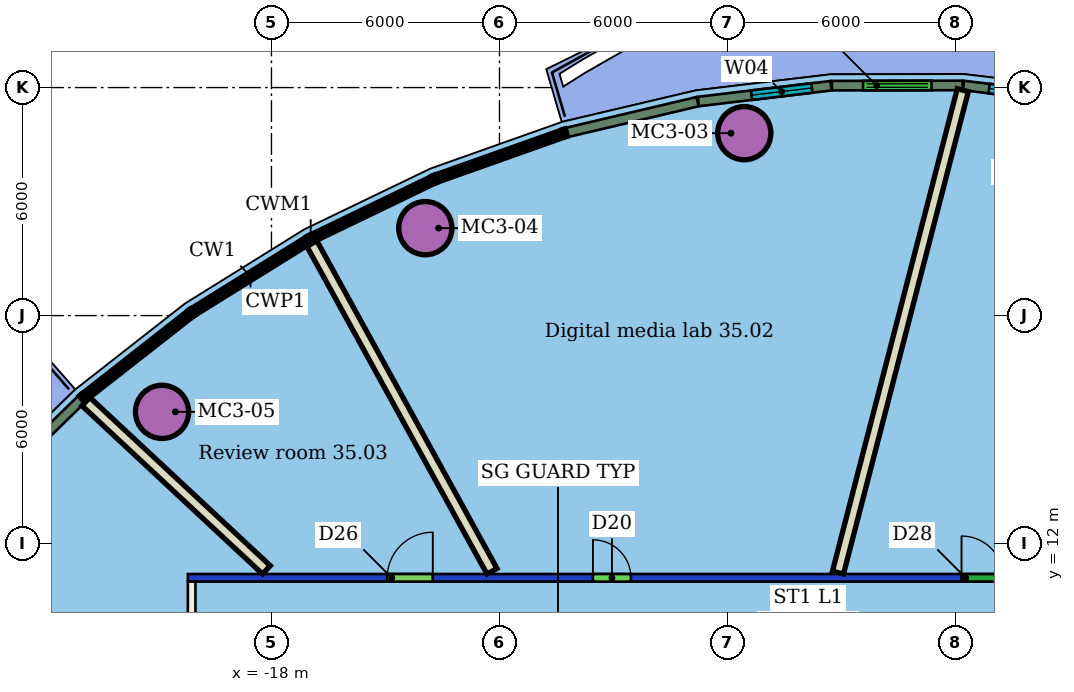
"""IFC4 building model, lengths in metres.
Left out: names, types, materials, properties, quantities, classifications, styles, units other than length and angle.
Written with IfcOpenShell. Run it as: python <this file> out.ifc"""

import sys

from ifc_helpers import new_model, si_unit, direction, frame, frame_2d, origin, origin_2d, place, context, subcontext, project, spatial, rectangle, hollow_circle, extrude, element, fill, save


model = new_model("IFC4")
c1 = context("Model", 3, precision=1e-05, world=origin(), true_north=direction((0.0, 1.0)))
c2 = subcontext(c1, "Body", "Model", "MODEL_VIEW")
j1 = project(units=[si_unit("LENGTHUNIT", "METRE"), si_unit("PLANEANGLEUNIT", "RADIAN")], contexts=[c1])
p1 = place(None, origin())
s1 = spatial("IfcSite", under=j1, at=p1, CompositionType="ELEMENT")
p2 = place(p1, origin())
s2 = spatial("IfcBuilding", under=s1, at=p2, CompositionType="ELEMENT")
p3 = place(p2, frame((0.0, 0.0, 150.6)))
s3 = spatial("IfcBuildingStorey", under=s2, at=p3, CompositionType="ELEMENT", Elevation=150.6)
for number, where, z_axis, x_axis in (
    (1, (-5.558, 22.8, 0.0), (0.0, 0.0, 1.0), (1.0, 0.0, 0.0)),
    (2, (-13.952, 20.301, 0.0), (0.0, 0.0, 1.0), (1.0, 0.0, 0.0)),
    (3, (-20.879, 15.467, 0.0), (0.0, 0.0, 1.0), (1.0, 0.0, 0.0)),
):
    element("IfcColumn", number, at=place(p3, frame(where, z_axis=z_axis, x_axis=x_axis)), inside=s3, PredefinedType="COLUMN", context=c2, shape_type="SweptSolid", body=[
        extrude(hollow_circle(Radius=0.7, WallThickness=0.05, at=origin_2d()), origin(), (0.0, 0.0, 1.0), 3.45),
    ])
p4 = place(p3, frame((-20.1, -11.0, 0.0), z_axis=(0.0, 0.0, 1.0), x_axis=(0.0, 1.0, 0.0)))
e4 = element("IfcWall", 4, at=p4, inside=s3, PredefinedType="PARTITIONING", context=c2, shape_type="SweptSolid", body=[
    extrude(rectangle(XDim=22.0, YDim=0.2, at=frame_2d((11.0, 0.0))), origin(), (0.0, 0.0, 1.0), 3.45),
])
p5 = place(p4, frame((16.014, 0.0, 0.0)))
e5 = element("IfcOpeningElement", 5, at=p5, cuts=e4, PredefinedType="OPENING", context=c2, shape_type="SweptSolid", body=[
    extrude(rectangle(XDim=1.2, YDim=2.1, at=frame_2d((0.6, 1.05))), frame((0.0, 0.11, 0.0), z_axis=(0.0, -1.0, 0.0), x_axis=(1.0, 0.0, 0.0)), (0.0, 0.0, 1.0), 0.22),
])
p6 = place(p4, frame((9.012, 0.0, 0.0)))
e6 = element("IfcOpeningElement", 6, at=p6, cuts=e4, PredefinedType="OPENING", context=c2, shape_type="SweptSolid", body=[
    extrude(rectangle(XDim=1.8, YDim=2.4, at=frame_2d((0.9, 1.2))), frame((0.0, 0.11, 0.0), z_axis=(0.0, -1.0, 0.0), x_axis=(1.0, 0.0, 0.0)), (0.0, 0.0, 1.0), 0.22),
])
p7 = place(p3, frame((-20.2, 11.1, 0.0), z_axis=(0.0, 0.0, 1.0), x_axis=(1.0, 0.0, 0.0)))
e7 = element("IfcWall", 7, at=p7, inside=s3, PredefinedType="PARTITIONING", context=c2, shape_type="SweptSolid", body=[
    extrude(rectangle(XDim=28.4, YDim=0.2, at=frame_2d((14.2, 0.0))), origin(), (0.0, 0.0, 1.0), 3.05),
])
p8 = place(p7, frame((20.358, 0.0, 0.0)))
e8 = element("IfcOpeningElement", 8, at=p8, cuts=e7, PredefinedType="OPENING", context=c2, shape_type="SweptSolid", body=[
    extrude(rectangle(XDim=1.1, YDim=2.1, at=frame_2d((0.55, 1.05))), frame((0.0, 0.11, 0.0), z_axis=(0.0, -1.0, 0.0), x_axis=(1.0, 0.0, 0.0)), (0.0, 0.0, 1.0), 0.22),
])
p9 = place(p7, frame((10.659, 0.0, 0.0)))
e9 = element("IfcOpeningElement", 9, at=p9, cuts=e7, PredefinedType="OPENING", context=c2, shape_type="SweptSolid", body=[
    extrude(rectangle(XDim=1.0, YDim=2.1, at=frame_2d((0.5, 1.05))), frame((0.0, 0.11, 0.0), z_axis=(0.0, -1.0, 0.0), x_axis=(1.0, 0.0, 0.0)), (0.0, 0.0, 1.0), 0.22),
])
p10 = place(p7, frame((5.245, 0.0, 0.0)))
e10 = element("IfcOpeningElement", 10, at=p10, cuts=e7, PredefinedType="OPENING", context=c2, shape_type="SweptSolid", body=[
    extrude(rectangle(XDim=1.2, YDim=2.1, at=frame_2d((0.6, 1.05))), frame((0.0, 0.11, 0.0), z_axis=(0.0, -1.0, 0.0), x_axis=(1.0, 0.0, 0.0)), (0.0, 0.0, 1.0), 0.22),
])
p11 = place(p3, frame((0.192, 23.931, 0.0), z_axis=(0.0, 0.0, 1.0), x_axis=(-0.25047941352, -0.968121925897, 0.0)))
e11 = element("IfcWall", 11, at=p11, inside=s3, PredefinedType="PARTITIONING", context=c2, shape_type="SweptSolid", body=[
    extrude(rectangle(XDim=13.112, YDim=0.3, at=frame_2d((6.556, 0.0))), origin(), (0.0, 0.0, 1.0), 3.45),
])
p12 = place(p3, frame((-16.937, 19.894, 0.0), z_axis=(0.0, 0.0, 1.0), x_axis=(0.48175299215, -0.87630705495, 0.0)))
e12 = element("IfcWall", 12, at=p12, inside=s3, PredefinedType="PARTITIONING", context=c2, shape_type="SweptSolid", body=[
    extrude(rectangle(XDim=9.839, YDim=0.3, at=frame_2d((4.919, 0.0))), origin(), (0.0, 0.0, 1.0), 3.45),
])
p13 = place(p3, frame((-22.883, 15.737, 0.0), z_axis=(0.0, 0.0, 1.0), x_axis=(0.731506509166, -0.681834457217, 0.0)))
e13 = element("IfcWall", 13, at=p13, inside=s3, PredefinedType="PARTITIONING", context=c2, shape_type="SweptSolid", body=[
    extrude(rectangle(XDim=6.493, YDim=0.3, at=frame_2d((3.246, 0.0))), origin(), (0.0, 0.0, 1.0), 3.45),
])
p14 = place(p3, frame((3.543, 23.651, 0.0), z_axis=(0.0, 0.0, 1.0), x_axis=(-0.992754830244, 0.120157592466, 0.0)))
e14 = element("IfcWall", 14, at=p14, inside=s3, PredefinedType="SOLIDWALL", context=c2, shape_type="SweptSolid", body=[
    extrude(rectangle(XDim=3.357, YDim=0.25, at=frame_2d((1.678, 0.0))), origin(), (0.0, 0.0, 1.0), 3.1),
])
p15 = place(p14, frame((0.678, 0.0, 0.9)))
e15 = element("IfcOpeningElement", 15, at=p15, cuts=e14, PredefinedType="OPENING", context=c2, shape_type="SweptSolid", body=[
    extrude(rectangle(XDim=2.0, YDim=2.1, at=frame_2d((1.0, 1.05))), frame((0.0, 0.135, 0.0), z_axis=(0.0, -1.0, 0.0), x_axis=(1.0, 0.0, 0.0)), (0.0, 0.0, 1.0), 0.27),
])
p16 = place(p3, frame((0.187, 24.056, 0.0), z_axis=(0.0, 0.0, 1.0), x_axis=(-0.999998549944, -0.001702970638, 0.0)))
e16 = element("IfcWall", 16, at=p16, inside=s3, PredefinedType="SOLIDWALL", context=c2, shape_type="SweptSolid", body=[
    extrude(rectangle(XDim=3.441, YDim=0.25, at=frame_2d((1.72, 0.0))), origin(), (0.0, 0.0, 1.0), 3.1),
])
p17 = place(p16, frame((0.82, 0.0, 0.0)))
e17 = element("IfcOpeningElement", 17, at=p17, cuts=e16, PredefinedType="OPENING", context=c2, shape_type="SweptSolid", body=[
    extrude(rectangle(XDim=1.8, YDim=2.4, at=frame_2d((0.9, 1.2))), frame((0.0, 0.135, 0.0), z_axis=(0.0, -1.0, 0.0), x_axis=(1.0, 0.0, 0.0)), (0.0, 0.0, 1.0), 0.27),
])
p18 = place(p3, frame((-3.276, 24.049, 0.0), z_axis=(0.0, 0.0, 1.0), x_axis=(-0.992969234445, -0.11837271411, 0.0)))
e18 = element("IfcWall", 18, at=p18, inside=s3, PredefinedType="SOLIDWALL", context=c2, shape_type="SweptSolid", body=[
    extrude(rectangle(XDim=3.514, YDim=0.25, at=frame_2d((1.757, 0.0))), origin(), (0.0, 0.0, 1.0), 3.1),
])
p19 = place(p18, frame((0.507, 0.0, 0.9)))
e19 = element("IfcOpeningElement", 19, at=p19, cuts=e18, PredefinedType="OPENING", context=c2, shape_type="SweptSolid", body=[
    extrude(rectangle(XDim=1.6, YDim=2.1, at=frame_2d((0.8, 1.05))), frame((0.0, 0.135, 0.0), z_axis=(0.0, -1.0, 0.0), x_axis=(1.0, 0.0, 0.0)), (0.0, 0.0, 1.0), 0.27),
])
p20 = place(p3, frame((-6.787, 23.629, 0.0), z_axis=(0.0, 0.0, 1.0), x_axis=(-0.973349080419, -0.229328514683, 0.0)))
e20 = element("IfcWall", 20, at=p20, inside=s3, PredefinedType="SOLIDWALL", context=c2, shape_type="SweptSolid", body=[
    extrude(rectangle(XDim=3.529, YDim=0.25, at=frame_2d((1.765, 0.0))), origin(), (0.0, 0.0, 1.0), 3.1),
])
p21 = place(p3, frame((-23.005, 15.792, 0.0), z_axis=(0.0, 0.0, 1.0), x_axis=(-0.715154193922, -0.698966722324, 0.0)))
e21 = element("IfcWall", 21, at=p21, inside=s3, PredefinedType="SOLIDWALL", context=c2, shape_type="SweptSolid", body=[
    extrude(rectangle(XDim=3.529, YDim=0.25, at=frame_2d((1.765, 0.0))), origin(), (0.0, 0.0, 1.0), 3.1),
])
p22 = place(p8, origin())
e22 = element("IfcDoor", 22, at=p22, inside=s3, OperationType="SINGLE_SWING_LEFT", PredefinedType="DOOR", context=c2, shape_type="SweptSolid", body=[
    extrude(rectangle(XDim=1.1, YDim=2.1, at=frame_2d((0.55, 1.05))), frame((0.0, 0.025, 0.0), z_axis=(0.0, -1.0, 0.0), x_axis=(1.0, 0.0, 0.0)), (0.0, 0.0, 1.0), 0.05),
])
fill(e8, e22)
p23 = place(p9, origin())
e23 = element("IfcDoor", 23, at=p23, inside=s3, OperationType="SINGLE_SWING_LEFT", PredefinedType="DOOR", context=c2, shape_type="SweptSolid", body=[
    extrude(rectangle(XDim=1.0, YDim=2.1, at=frame_2d((0.5, 1.05))), frame((0.0, 0.025, 0.0), z_axis=(0.0, -1.0, 0.0), x_axis=(1.0, 0.0, 0.0)), (0.0, 0.0, 1.0), 0.05),
])
fill(e9, e23)
p24 = place(p10, origin())
e24 = element("IfcDoor", 24, at=p24, inside=s3, OperationType="SINGLE_SWING_RIGHT", PredefinedType="DOOR", context=c2, shape_type="SweptSolid", body=[
    extrude(rectangle(XDim=1.2, YDim=2.1, at=frame_2d((0.6, 1.05))), frame((0.0, 0.025, 0.0), z_axis=(0.0, -1.0, 0.0), x_axis=(1.0, 0.0, 0.0)), (0.0, 0.0, 1.0), 0.05),
])
fill(e10, e24)
p25 = place(p15, origin())
e25 = element("IfcWindow", 25, at=p25, inside=s3, PartitioningType="SINGLE_PANEL", PredefinedType="WINDOW", context=c2, shape_type="SweptSolid", body=[
    extrude(rectangle(XDim=2.0, YDim=2.1, at=frame_2d((1.0, 1.05))), frame((0.0, 0.03, 0.0), z_axis=(0.0, -1.0, 0.0), x_axis=(1.0, 0.0, 0.0)), (0.0, 0.0, 1.0), 0.06),
])
fill(e15, e25)
p26 = place(p17, origin())
e26 = element("IfcDoor", 26, at=p26, inside=s3, OperationType="DOUBLE_DOOR_SLIDING", PredefinedType="DOOR", context=c2, shape_type="SweptSolid", body=[
    extrude(rectangle(XDim=1.8, YDim=2.4, at=frame_2d((0.9, 1.2))), frame((0.0, 0.025, 0.0), z_axis=(0.0, -1.0, 0.0), x_axis=(1.0, 0.0, 0.0)), (0.0, 0.0, 1.0), 0.05),
])
fill(e17, e26)
p27 = place(p19, origin())
e27 = element("IfcWindow", 27, at=p27, inside=s3, PartitioningType="SINGLE_PANEL", PredefinedType="WINDOW", context=c2, shape_type="SweptSolid", body=[
    extrude(rectangle(XDim=1.6, YDim=2.1, at=frame_2d((0.8, 1.05))), frame((0.0, 0.03, 0.0), z_axis=(0.0, -1.0, 0.0), x_axis=(1.0, 0.0, 0.0)), (0.0, 0.0, 1.0), 0.06),
])
fill(e19, e27)
save(model, sys.argv[1])
